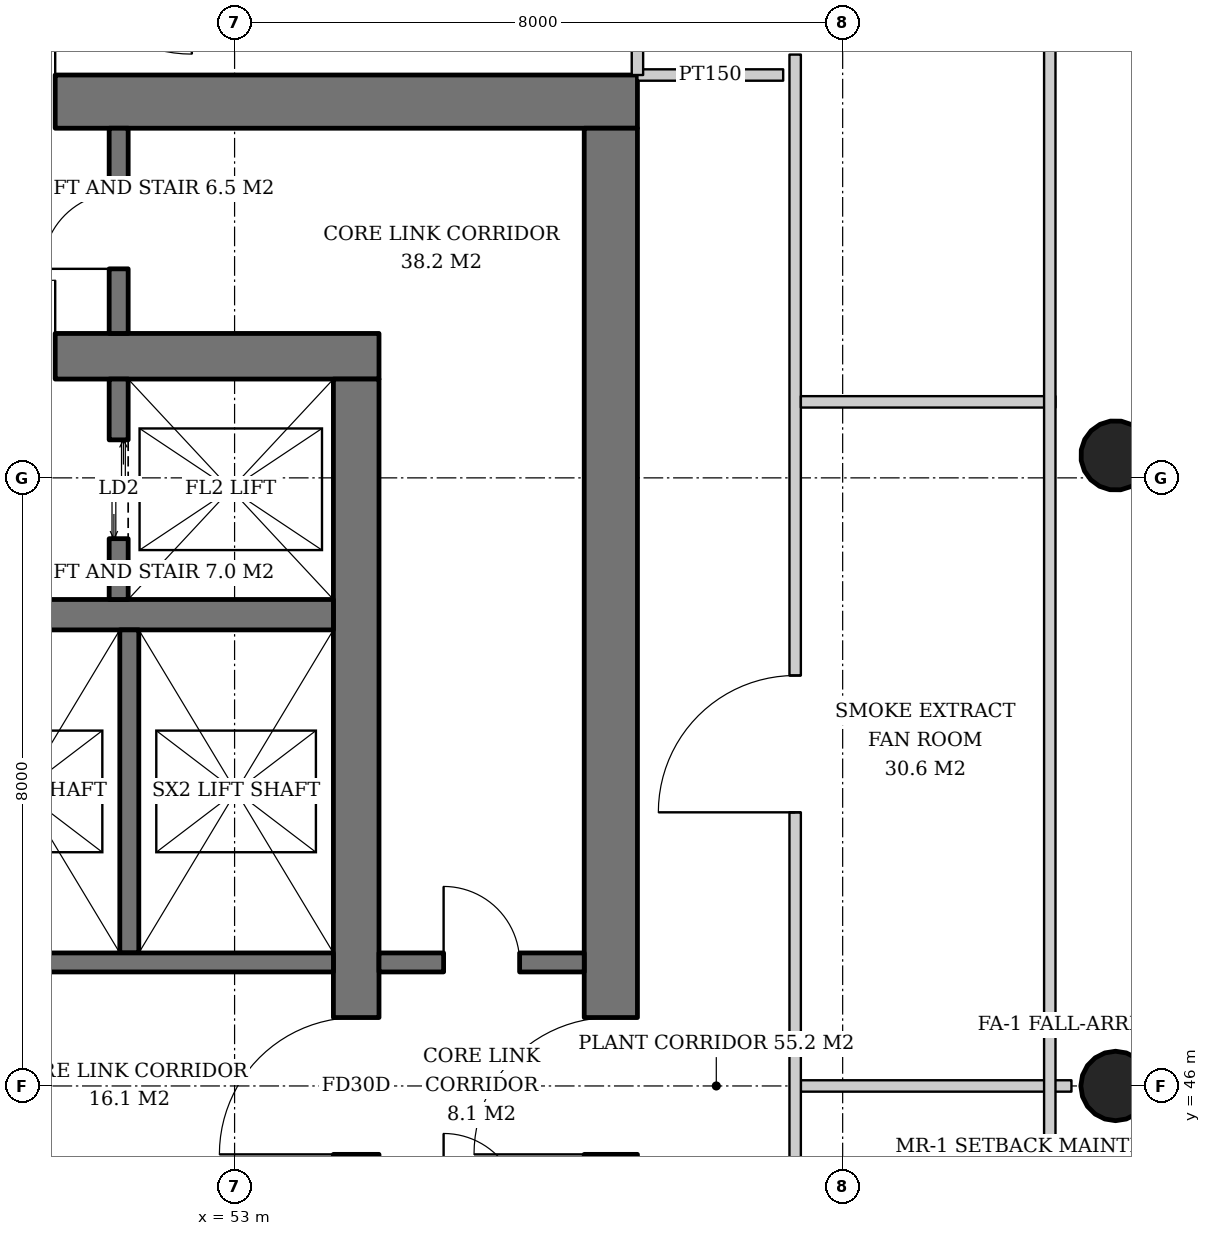
"""IFC4 building model, lengths in metres.
Left out: names, types, materials, properties, quantities, classifications, styles, units other than length and angle.
Written with IfcOpenShell. Run it as: python <this file> out.ifc"""

import sys

from ifc_helpers import new_model, si_unit, direction, frame, frame_2d, origin, origin_2d, place, context, subcontext, project, spatial, rectangle, hollow_circle, extrude, element, fill, save


model = new_model("IFC4")
c1 = context("Model", 3, precision=1e-05, world=origin(), true_north=direction((0.0, 1.0)))
c2 = subcontext(c1, "Body", "Model", "MODEL_VIEW")
j1 = project(units=[si_unit("LENGTHUNIT", "METRE"), si_unit("PLANEANGLEUNIT", "RADIAN")], contexts=[c1])
p1 = place(None, origin())
s1 = spatial("IfcSite", under=j1, at=p1, CompositionType="ELEMENT")
p2 = place(p1, origin())
s2 = spatial("IfcBuilding", under=s1, at=p2, CompositionType="ELEMENT")
p3 = place(p2, frame((0.0, 0.0, 157.8)))
s3 = spatial("IfcBuildingStorey", under=s2, at=p3, CompositionType="ELEMENT", Elevation=157.8)
p4 = place(p3, frame((60.529, 61.529, 0.0), z_axis=(-0.031898107953, -0.031898107953, 0.998981992539), x_axis=(0.707106781187, -0.707106781187, 0.0)))
e1 = element("IfcColumn", 1, at=p4, inside=s3, PredefinedType="COLUMN", context=c2, shape_type="SweptSolid", body=[
    extrude(rectangle(XDim=2.6, YDim=2.6, at=origin_2d()), origin(), (0.0, 0.0, 1.0), 3.804),
])
p5 = place(p3, frame((64.629, 46.0, 0.0), z_axis=(-0.031978496719, 0.0, 0.999488557087), x_axis=(0.0, -1.0, 0.0)))
e2 = element("IfcColumn", 2, at=p5, inside=s3, PredefinedType="COLUMN", context=c2, shape_type="SweptSolid", body=[
    extrude(hollow_circle(Radius=0.457, WallThickness=0.03, at=origin_2d()), origin(), (0.0, 0.0, 1.0), 3.802),
])
p6 = place(p3, frame((64.629, 54.314, 0.0), z_axis=(-0.031974442509, -0.015923015547, 0.999361842679), x_axis=(0.445775033553, -0.895145027055, 0.0)))
e3 = element("IfcColumn", 3, at=p6, inside=s3, PredefinedType="COLUMN", context=c2, shape_type="SweptSolid", body=[
    extrude(hollow_circle(Radius=0.457, WallThickness=0.03, at=origin_2d()), origin(), (0.0, 0.0, 1.0), 3.802),
])
p7 = place(p3, frame((35.1, 55.6, 0.0), z_axis=(0.0, 0.0, 1.0), x_axis=(1.0, 0.0, 0.0)))
e4 = element("IfcWall", 4, at=p7, inside=s3, PredefinedType="SHEAR", context=c2, shape_type="SweptSolid", body=[
    extrude(rectangle(XDim=19.8, YDim=0.6, at=frame_2d((9.9, 0.0))), origin(), (0.0, 0.0, 1.0), 3.8),
])
p8 = place(p7, frame((14.54, 0.0, 0.0)))
e5 = element("IfcOpeningElement", 5, at=p8, cuts=e4, PredefinedType="OPENING", context=c2, shape_type="SweptSolid", body=[
    extrude(rectangle(XDim=1.0, YDim=2.1, at=frame_2d((0.5, 1.05))), frame((0.0, 0.31, 0.0), z_axis=(0.0, -1.0, 0.0), x_axis=(1.0, 0.0, 0.0)), (0.0, 0.0, 1.0), 0.62),
])
p9 = place(p7, frame((2.425, 0.0, 0.0)))
e6 = element("IfcOpeningElement", 6, at=p9, cuts=e4, PredefinedType="OPENING", context=c2, shape_type="SweptSolid", body=[
    extrude(rectangle(XDim=1.0, YDim=2.1, at=frame_2d((0.5, 1.05))), frame((0.0, 0.31, 0.0), z_axis=(0.0, -1.0, 0.0), x_axis=(1.0, 0.0, 0.0)), (0.0, 0.0, 1.0), 0.62),
])
p10 = place(p3, frame((54.6, 36.7, 0.0), z_axis=(0.0, 0.0, 1.0), x_axis=(0.0, 1.0, 0.0)))
e7 = element("IfcWall", 7, at=p10, inside=s3, PredefinedType="SHEAR", context=c2, shape_type="SweptSolid", body=[
    extrude(rectangle(XDim=18.6, YDim=0.6, at=frame_2d((9.3, 0.0))), origin(), (0.0, 0.0, 1.0), 3.8),
])
p11 = place(p10, frame((8.4, 0.0, 0.0)))
e8 = element("IfcOpeningElement", 8, at=p11, cuts=e7, PredefinedType="OPENING", context=c2, shape_type="SweptSolid", body=[
    extrude(rectangle(XDim=1.8, YDim=2.4, at=frame_2d((0.9, 1.2))), frame((0.0, 0.31, 0.0), z_axis=(0.0, -1.0, 0.0), x_axis=(1.0, 0.0, 0.0)), (0.0, 0.0, 1.0), 0.62),
])
p12 = place(p3, frame((31.7, 58.95, 0.0), z_axis=(0.0, 0.0, 1.0), x_axis=(1.0, 0.0, 0.0)))
e9 = element("IfcWall", 9, at=p12, inside=s3, PredefinedType="SHEAR", context=c2, shape_type="SweptSolid", body=[
    extrude(rectangle(XDim=26.6, YDim=0.7, at=frame_2d((13.3, 0.0))), origin(), (0.0, 0.0, 1.0), 3.8),
])
p13 = place(p12, frame((17.94, 0.0, 0.0)))
e10 = element("IfcOpeningElement", 10, at=p13, cuts=e9, PredefinedType="OPENING", context=c2, shape_type="SweptSolid", body=[
    extrude(rectangle(XDim=1.0, YDim=2.1, at=frame_2d((0.5, 1.05))), frame((0.0, 0.36, 0.0), z_axis=(0.0, -1.0, 0.0), x_axis=(1.0, 0.0, 0.0)), (0.0, 0.0, 1.0), 0.72),
])
p14 = place(p12, frame((5.825, 0.0, 0.0)))
e11 = element("IfcOpeningElement", 11, at=p14, cuts=e9, PredefinedType="OPENING", context=c2, shape_type="SweptSolid", body=[
    extrude(rectangle(XDim=1.0, YDim=2.1, at=frame_2d((0.5, 1.05))), frame((0.0, 0.36, 0.0), z_axis=(0.0, -1.0, 0.0), x_axis=(1.0, 0.0, 0.0)), (0.0, 0.0, 1.0), 0.72),
])
p15 = place(p12, frame((2.587, 0.0, 0.0)))
e12 = element("IfcOpeningElement", 12, at=p15, cuts=e9, PredefinedType="OPENING", context=c2, shape_type="SweptSolid", body=[
    extrude(rectangle(XDim=1.0, YDim=2.1, at=frame_2d((0.5, 1.05))), frame((0.0, 0.36, 0.0), z_axis=(0.0, -1.0, 0.0), x_axis=(1.0, 0.0, 0.0)), (0.0, 0.0, 1.0), 0.72),
])
p16 = place(p3, frame((57.95, 33.4, 0.0), z_axis=(0.0, 0.0, 1.0), x_axis=(0.0, 1.0, 0.0)))
e13 = element("IfcWall", 13, at=p16, inside=s3, PredefinedType="SHEAR", context=c2, shape_type="SweptSolid", body=[
    extrude(rectangle(XDim=25.2, YDim=0.7, at=frame_2d((12.6, 0.0))), origin(), (0.0, 0.0, 1.0), 3.8),
])
p17 = place(p16, frame((11.7, 0.0, 0.0)))
e14 = element("IfcOpeningElement", 14, at=p17, cuts=e13, PredefinedType="OPENING", context=c2, shape_type="SweptSolid", body=[
    extrude(rectangle(XDim=1.8, YDim=2.4, at=frame_2d((0.9, 1.2))), frame((0.0, 0.36, 0.0), z_axis=(0.0, -1.0, 0.0), x_axis=(1.0, 0.0, 0.0)), (0.0, 0.0, 1.0), 0.72),
])
p18 = place(p3, frame((35.7, 52.2, 0.0), z_axis=(0.0, 0.0, 1.0), x_axis=(1.0, 0.0, 0.0)))
e15 = element("IfcWall", 15, at=p18, inside=s3, PredefinedType="SHEAR", context=c2, shape_type="SweptSolid", body=[
    extrude(rectangle(XDim=18.6, YDim=0.4, at=frame_2d((9.3, 0.0))), origin(), (0.0, 0.0, 1.0), 3.8),
])
p19 = place(p3, frame((51.475, 52.4, 0.0), z_axis=(0.0, 0.0, 1.0), x_axis=(0.0, 1.0, 0.0)))
e16 = element("IfcWall", 16, at=p19, inside=s3, PredefinedType="SHEAR", context=c2, shape_type="SweptSolid", body=[
    extrude(rectangle(XDim=2.9, YDim=0.25, at=frame_2d((1.45, 0.0))), origin(), (0.0, 0.0, 1.0), 3.8),
])
p20 = place(p19, frame((0.8, 0.0, 0.0)))
e17 = element("IfcOpeningElement", 17, at=p20, cuts=e16, PredefinedType="OPENING", context=c2, shape_type="SweptSolid", body=[
    extrude(rectangle(XDim=1.3, YDim=2.2, at=frame_2d((0.65, 1.1))), frame((0.0, 0.135, 0.0), z_axis=(0.0, -1.0, 0.0), x_axis=(1.0, 0.0, 0.0)), (0.0, 0.0, 1.0), 0.27),
])
p21 = place(p3, frame((51.615, 47.75, 0.0), z_axis=(0.0, 0.0, 1.0), x_axis=(0.0, 1.0, 0.0)))
e18 = element("IfcWall", 18, at=p21, inside=s3, PredefinedType="SHEAR", context=c2, shape_type="SweptSolid", body=[
    extrude(rectangle(XDim=4.25, YDim=0.25, at=frame_2d((2.125, 0.0))), origin(), (0.0, 0.0, 1.0), 3.8),
])
p22 = place(p3, frame((48.93, 47.625, 0.0), z_axis=(0.0, 0.0, 1.0), x_axis=(1.0, 0.0, 0.0)))
e19 = element("IfcWall", 19, at=p22, inside=s3, PredefinedType="SHEAR", context=c2, shape_type="SweptSolid", body=[
    extrude(rectangle(XDim=5.37, YDim=0.25, at=frame_2d((2.685, 0.0))), origin(), (0.0, 0.0, 1.0), 3.8),
])
p23 = place(p3, frame((51.475, 55.9, 0.0), z_axis=(0.0, 0.0, 1.0), x_axis=(0.0, 1.0, 0.0)))
e20 = element("IfcWall", 20, at=p23, inside=s3, PredefinedType="SOLIDWALL", context=c2, shape_type="SweptSolid", body=[
    extrude(rectangle(XDim=2.7, YDim=0.25, at=frame_2d((1.35, 0.0))), origin(), (0.0, 0.0, 1.0), 3.52),
])
p24 = place(p23, frame((0.85, 0.0, 0.0)))
e21 = element("IfcOpeningElement", 21, at=p24, cuts=e20, PredefinedType="OPENING", context=c2, shape_type="SweptSolid", body=[
    extrude(rectangle(XDim=1.0, YDim=2.1, at=frame_2d((0.5, 1.05))), frame((0.0, 0.135, 0.0), z_axis=(0.0, -1.0, 0.0), x_axis=(1.0, 0.0, 0.0)), (0.0, 0.0, 1.0), 0.27),
])
p25 = place(p3, frame((54.9, 47.625, 0.0), z_axis=(0.0, 0.0, 1.0), x_axis=(1.0, 0.0, 0.0)))
e22 = element("IfcWall", 22, at=p25, inside=s3, PredefinedType="SOLIDWALL", context=c2, shape_type="SweptSolid", body=[
    extrude(rectangle(XDim=2.7, YDim=0.25, at=frame_2d((1.35, 0.0))), origin(), (0.0, 0.0, 1.0), 3.52),
])
p26 = place(p25, frame((0.85, 0.0, 0.0)))
e23 = element("IfcOpeningElement", 23, at=p26, cuts=e22, PredefinedType="OPENING", context=c2, shape_type="SweptSolid", body=[
    extrude(rectangle(XDim=1.0, YDim=2.1, at=frame_2d((0.5, 1.05))), frame((0.0, 0.135, 0.0), z_axis=(0.0, -1.0, 0.0), x_axis=(1.0, 0.0, 0.0)), (0.0, 0.0, 1.0), 0.27),
])
p27 = place(p3, frame((58.3, 59.3, 0.0), z_axis=(0.0, 0.0, 1.0), x_axis=(1.0, 0.0, 0.0)))
e24 = element("IfcWall", 24, at=p27, inside=s3, PredefinedType="PARTITIONING", context=c2, shape_type="SweptSolid", body=[
    extrude(rectangle(XDim=1.917, YDim=0.15, at=frame_2d((0.958, 0.0))), origin(), (0.0, 0.0, 1.0), 3.52),
])
p28 = place(p3, frame((60.45, 46.0, 0.0), z_axis=(0.0, 0.0, 1.0), x_axis=(1.0, 0.0, 0.0)))
e25 = element("IfcWall", 25, at=p28, inside=s3, PredefinedType="SOLIDWALL", context=c2, shape_type="SweptSolid", body=[
    extrude(rectangle(XDim=3.56, YDim=0.15, at=frame_2d((1.78, 0.0))), origin(), (0.0, 0.0, 1.0), 3.52),
])
p29 = place(p3, frame((60.375, 32.431, 0.0), z_axis=(0.0, 0.0, 1.0), x_axis=(0.0, 1.0, 0.0)))
e26 = element("IfcWall", 26, at=p29, inside=s3, PredefinedType="SOLIDWALL", context=c2, shape_type="SweptSolid", body=[
    extrude(rectangle(XDim=27.137, YDim=0.15, at=frame_2d((13.569, 0.0))), origin(), (0.0, 0.0, 1.0), 2.706),
])
p30 = place(p29, frame((0.969, 0.0, 0.0)))
e27 = element("IfcOpeningElement", 27, at=p30, cuts=e26, PredefinedType="OPENING", context=c2, shape_type="SweptSolid", body=[
    extrude(rectangle(XDim=1.0, YDim=2.1, at=frame_2d((0.5, 1.05))), frame((0.0, 0.085, 0.0), z_axis=(0.0, -1.0, 0.0), x_axis=(1.0, 0.0, 0.0)), (0.0, 0.0, 1.0), 0.17),
])
p31 = place(p29, frame((7.169, 0.0, 0.0)))
e28 = element("IfcOpeningElement", 28, at=p31, cuts=e26, PredefinedType="OPENING", context=c2, shape_type="SweptSolid", body=[
    extrude(rectangle(XDim=1.8, YDim=2.4, at=frame_2d((0.9, 1.2))), frame((0.0, 0.085, 0.0), z_axis=(0.0, -1.0, 0.0), x_axis=(1.0, 0.0, 0.0)), (0.0, 0.0, 1.0), 0.17),
])
p32 = place(p29, frame((17.169, 0.0, 0.0)))
e29 = element("IfcOpeningElement", 29, at=p32, cuts=e26, PredefinedType="OPENING", context=c2, shape_type="SweptSolid", body=[
    extrude(rectangle(XDim=1.8, YDim=2.4, at=frame_2d((0.9, 1.2))), frame((0.0, 0.085, 0.0), z_axis=(0.0, -1.0, 0.0), x_axis=(1.0, 0.0, 0.0)), (0.0, 0.0, 1.0), 0.17),
])
p33 = place(p3, frame((60.45, 55.0, 0.0), z_axis=(0.0, 0.0, 1.0), x_axis=(1.0, 0.0, 0.0)))
e30 = element("IfcWall", 30, at=p33, inside=s3, PredefinedType="SOLIDWALL", context=c2, shape_type="SweptSolid", body=[
    extrude(rectangle(XDim=3.35, YDim=0.15, at=frame_2d((1.675, 0.0))), origin(), (0.0, 0.0, 1.0), 3.52),
])
p34 = place(p3, frame((58.3, 59.3, 0.0), z_axis=(0.0, 0.0, 1.0), x_axis=(0.0, 1.0, 0.0)))
e31 = element("IfcWall", 31, at=p34, inside=s3, PredefinedType="PARTITIONING", context=c2, shape_type="SweptSolid", body=[
    extrude(rectangle(XDim=1.917, YDim=0.15, at=frame_2d((0.958, 0.0))), origin(), (0.0, 0.0, 1.0), 3.52),
])
p35 = place(p3, frame((63.725, 61.8, 0.0), z_axis=(0.0, 0.0, 1.0), x_axis=(0.0, -1.0, 0.0)))
e32 = element("IfcWall", 32, at=p35, inside=s3, PredefinedType="PARTITIONING", context=c2, shape_type="SweptSolid", body=[
    extrude(rectangle(XDim=31.6, YDim=0.15, at=frame_2d((15.8, 0.0))), origin(), (0.0, 0.0, 1.0), 2.706),
])
p36 = place(p20, origin())
e33 = element("IfcDoor", 33, at=p36, inside=s3, OperationType="DOUBLE_DOOR_SLIDING", PredefinedType="DOOR", context=c2, shape_type="SweptSolid", body=[
    extrude(rectangle(XDim=1.3, YDim=2.2, at=frame_2d((0.65, 1.1))), frame((0.0, 0.025, 0.0), z_axis=(0.0, -1.0, 0.0), x_axis=(1.0, 0.0, 0.0)), (0.0, 0.0, 1.0), 0.05),
])
fill(e17, e33)
p37 = place(p24, origin())
e34 = element("IfcDoor", 34, at=p37, inside=s3, OperationType="SINGLE_SWING_LEFT", PredefinedType="DOOR", context=c2, shape_type="SweptSolid", body=[
    extrude(rectangle(XDim=1.0, YDim=2.1, at=frame_2d((0.5, 1.05))), frame((0.0, 0.025, 0.0), z_axis=(0.0, -1.0, 0.0), x_axis=(1.0, 0.0, 0.0)), (0.0, 0.0, 1.0), 0.05),
])
fill(e21, e34)
p38 = place(p26, origin())
e35 = element("IfcDoor", 35, at=p38, inside=s3, OperationType="SINGLE_SWING_LEFT", PredefinedType="DOOR", context=c2, shape_type="SweptSolid", body=[
    extrude(rectangle(XDim=1.0, YDim=2.1, at=frame_2d((0.5, 1.05))), frame((0.0, 0.025, 0.0), z_axis=(0.0, -1.0, 0.0), x_axis=(1.0, 0.0, 0.0)), (0.0, 0.0, 1.0), 0.05),
])
fill(e23, e35)
p39 = place(p8, origin())
e36 = element("IfcDoor", 36, at=p39, inside=s3, OperationType="SINGLE_SWING_RIGHT", PredefinedType="DOOR", context=c2, shape_type="SweptSolid", body=[
    extrude(rectangle(XDim=1.0, YDim=2.1, at=frame_2d((0.5, 1.05))), frame((0.0, 0.025, 0.0), z_axis=(0.0, -1.0, 0.0), x_axis=(1.0, 0.0, 0.0)), (0.0, 0.0, 1.0), 0.05),
])
fill(e5, e36)
p40 = place(p11, origin())
e37 = element("IfcDoor", 37, at=p40, inside=s3, OperationType="DOUBLE_DOOR_SINGLE_SWING", PredefinedType="DOOR", context=c2, shape_type="SweptSolid", body=[
    extrude(rectangle(XDim=1.8, YDim=2.4, at=frame_2d((0.9, 1.2))), frame((0.0, 0.025, 0.0), z_axis=(0.0, -1.0, 0.0), x_axis=(1.0, 0.0, 0.0)), (0.0, 0.0, 1.0), 0.05),
])
fill(e8, e37)
p41 = place(p17, origin())
e38 = element("IfcDoor", 38, at=p41, inside=s3, OperationType="DOUBLE_DOOR_SINGLE_SWING", PredefinedType="DOOR", context=c2, shape_type="SweptSolid", body=[
    extrude(rectangle(XDim=1.8, YDim=2.4, at=frame_2d((0.9, 1.2))), frame((0.0, 0.025, 0.0), z_axis=(0.0, -1.0, 0.0), x_axis=(1.0, 0.0, 0.0)), (0.0, 0.0, 1.0), 0.05),
])
fill(e14, e38)
p42 = place(p13, origin())
e39 = element("IfcDoor", 39, at=p42, inside=s3, OperationType="SINGLE_SWING_RIGHT", PredefinedType="DOOR", context=c2, shape_type="SweptSolid", body=[
    extrude(rectangle(XDim=1.0, YDim=2.1, at=frame_2d((0.5, 1.05))), frame((0.0, 0.025, 0.0), z_axis=(0.0, -1.0, 0.0), x_axis=(1.0, 0.0, 0.0)), (0.0, 0.0, 1.0), 0.05),
])
fill(e10, e39)
p43 = place(p32, origin())
e40 = element("IfcDoor", 40, at=p43, inside=s3, OperationType="DOUBLE_DOOR_SINGLE_SWING", PredefinedType="DOOR", context=c2, shape_type="SweptSolid", body=[
    extrude(rectangle(XDim=1.8, YDim=2.4, at=frame_2d((0.9, 1.2))), frame((0.0, 0.025, 0.0), z_axis=(0.0, -1.0, 0.0), x_axis=(1.0, 0.0, 0.0)), (0.0, 0.0, 1.0), 0.05),
])
fill(e29, e40)
save(model, sys.argv[1])
